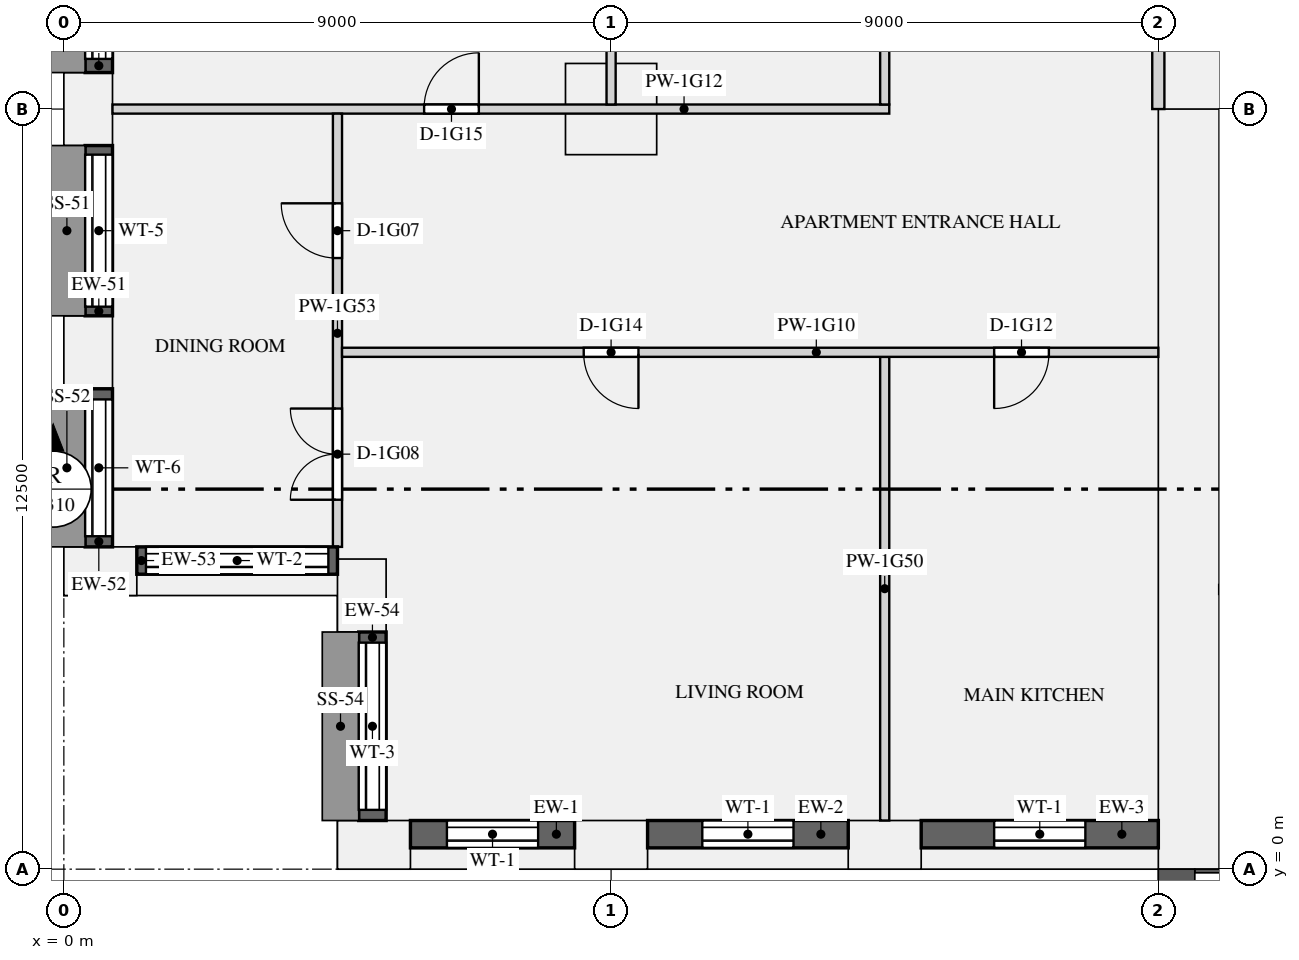
"""IFC4 building model, lengths in metres.
Left out: names, types, materials, properties, quantities, classifications, styles, units other than length and angle.
Written with IfcOpenShell. Run it as: python <this file> out.ifc"""

import sys

from ifc_helpers import new_model, si_unit, direction, frame, frame_2d, origin, origin_2d, place, context, subcontext, project, spatial, rectangle, extrude, element, fill, save


model = new_model("IFC4")
c1 = context("Model", 3, precision=1e-05, world=origin(), true_north=direction((0.0, 1.0)))
c2 = subcontext(c1, "Body", "Model", "MODEL_VIEW")
j1 = project(units=[si_unit("LENGTHUNIT", "METRE"), si_unit("PLANEANGLEUNIT", "RADIAN")], contexts=[c1])
p1 = place(None, origin())
s1 = spatial("IfcSite", under=j1, at=p1, CompositionType="ELEMENT")
p2 = place(p1, origin())
s2 = spatial("IfcBuilding", under=s1, at=p2, CompositionType="ELEMENT")
p3 = place(p2, frame((0.0, 0.0, 66.75)))
s3 = spatial("IfcBuildingStorey", under=s2, at=p3, CompositionType="ELEMENT", Elevation=66.75)
for number, where, z_axis, x_axis in (
    (1, (5.1, 0.4, 0.0), (0.0, 0.0, 1.0), (1.0, 0.0, 0.0)),
    (2, (9.0, 0.4, 0.0), (0.0, 0.0, 1.0), (1.0, 0.0, 0.0)),
    (3, (13.5, 0.4, 0.0), (0.0, 0.0, 1.0), (1.0, 0.0, 0.0)),
    (4, (0.4, 12.5, 0.0), (0.0, 0.0, 1.0), (0.0, -1.0, 0.0)),
    (5, (0.4, 8.5, 0.0), (0.0, 0.0, 1.0), (0.0, -1.0, 0.0)),
    (6, (0.6, 4.9, 0.0), (0.0, 0.0, 1.0), (1.0, 0.0, 0.0)),
    (7, (4.9, 4.5, 0.0), (0.0, 0.0, 1.0), (0.0, -1.0, 0.0)),
):
    element("IfcColumn", number, at=place(p3, frame(where, z_axis=z_axis, x_axis=x_axis)), inside=s3, PredefinedType="USERDEFINED", context=c2, shape_type="SweptSolid", body=[
        extrude(rectangle(XDim=1.2, YDim=0.8, at=origin_2d()), origin(), (0.0, 0.0, 1.0), 3.15),
    ])
p4 = place(p3, frame((9.0, 12.5, 0.0), z_axis=(0.0, 0.0, 1.0), x_axis=(1.0, 0.0, 0.0)))
e8 = element("IfcColumn", 8, at=p4, inside=s3, PredefinedType="COLUMN", context=c2, shape_type="SweptSolid", body=[
    extrude(rectangle(XDim=1.5, YDim=1.5, at=origin_2d()), origin(), (0.0, 0.0, 1.0), 3.15),
])
p5 = place(p3, frame((18.5, 0.0, 0.0), z_axis=(0.0, 0.0, 1.0), x_axis=(0.0, 1.0, 0.0)))
e9 = element("IfcWall", 9, at=p5, inside=s3, PredefinedType="SHEAR", context=c2, shape_type="SweptSolid", body=[
    extrude(rectangle(XDim=12.5, YDim=1.0, at=frame_2d((6.25, 0.0))), origin(), (0.0, 0.0, 1.0), 3.15),
])
p6 = place(p3, frame((5.7, 0.575, 0.9), z_axis=(0.0, 0.0, 1.0), x_axis=(1.0, 0.0, 0.0)))
e10 = element("IfcWall", 10, at=p6, inside=s3, PredefinedType="SOLIDWALL", context=c2, shape_type="SweptSolid", body=[
    extrude(rectangle(XDim=2.7, YDim=0.45, at=frame_2d((1.35, 0.0))), origin(), (0.0, 0.0, 1.0), 1.93),
])
p7 = place(p6, frame((0.6, 0.0, 0.15)))
e11 = element("IfcOpeningElement", 11, at=p7, cuts=e10, PredefinedType="OPENING", context=c2, shape_type="SweptSolid", body=[
    extrude(rectangle(XDim=1.5, YDim=1.5, at=frame_2d((0.75, 0.75))), frame((0.0, 0.235, 0.0), z_axis=(0.0, -1.0, 0.0), x_axis=(1.0, 0.0, 0.0)), (0.0, 0.0, 1.0), 0.47),
])
p8 = place(p3, frame((9.6, 0.575, 0.9), z_axis=(0.0, 0.0, 1.0), x_axis=(1.0, 0.0, 0.0)))
e12 = element("IfcWall", 12, at=p8, inside=s3, PredefinedType="SOLIDWALL", context=c2, shape_type="SweptSolid", body=[
    extrude(rectangle(XDim=3.3, YDim=0.45, at=frame_2d((1.65, 0.0))), origin(), (0.0, 0.0, 1.0), 1.93),
])
p9 = place(p8, frame((0.9, 0.0, 0.15)))
e13 = element("IfcOpeningElement", 13, at=p9, cuts=e12, PredefinedType="OPENING", context=c2, shape_type="SweptSolid", body=[
    extrude(rectangle(XDim=1.5, YDim=1.5, at=frame_2d((0.75, 0.75))), frame((0.0, 0.235, 0.0), z_axis=(0.0, -1.0, 0.0), x_axis=(1.0, 0.0, 0.0)), (0.0, 0.0, 1.0), 0.47),
])
p10 = place(p3, frame((14.1, 0.575, 0.9), z_axis=(0.0, 0.0, 1.0), x_axis=(1.0, 0.0, 0.0)))
e14 = element("IfcWall", 14, at=p10, inside=s3, PredefinedType="SOLIDWALL", context=c2, shape_type="SweptSolid", body=[
    extrude(rectangle(XDim=3.9, YDim=0.45, at=frame_2d((1.95, 0.0))), origin(), (0.0, 0.0, 1.0), 1.93),
])
p11 = place(p10, frame((1.2, 0.0, 0.15)))
e15 = element("IfcOpeningElement", 15, at=p11, cuts=e14, PredefinedType="OPENING", context=c2, shape_type="SweptSolid", body=[
    extrude(rectangle(XDim=1.5, YDim=1.5, at=frame_2d((0.75, 0.75))), frame((0.0, 0.235, 0.0), z_axis=(0.0, -1.0, 0.0), x_axis=(1.0, 0.0, 0.0)), (0.0, 0.0, 1.0), 0.47),
])
p12 = place(p3, frame((0.575, 15.3, 0.9), z_axis=(0.0, 0.0, 1.0), x_axis=(0.0, -1.0, 0.0)))
e16 = element("IfcWall", 16, at=p12, inside=s3, PredefinedType="SOLIDWALL", context=c2, shape_type="SweptSolid", body=[
    extrude(rectangle(XDim=2.2, YDim=0.45, at=frame_2d((1.1, 0.0))), origin(), (0.0, 0.0, 1.0), 1.93),
])
p13 = place(p12, frame((0.225, 0.0, 0.15)))
e17 = element("IfcOpeningElement", 17, at=p13, cuts=e16, PredefinedType="OPENING", context=c2, shape_type="SweptSolid", body=[
    extrude(rectangle(XDim=1.75, YDim=1.5, at=frame_2d((0.875, 0.75))), frame((0.0, 0.235, 0.0), z_axis=(0.0, -1.0, 0.0), x_axis=(1.0, 0.0, 0.0)), (0.0, 0.0, 1.0), 0.47),
])
p14 = place(p3, frame((0.575, 11.9, 0.9), z_axis=(0.0, 0.0, 1.0), x_axis=(0.0, -1.0, 0.0)))
e18 = element("IfcWall", 18, at=p14, inside=s3, PredefinedType="SOLIDWALL", context=c2, shape_type="SweptSolid", body=[
    extrude(rectangle(XDim=2.8, YDim=0.45, at=frame_2d((1.4, 0.0))), origin(), (0.0, 0.0, 1.0), 1.93),
])
p15 = place(p14, frame((0.15, 0.0, 0.15)))
e19 = element("IfcOpeningElement", 19, at=p15, cuts=e18, PredefinedType="OPENING", context=c2, shape_type="SweptSolid", body=[
    extrude(rectangle(XDim=2.5, YDim=1.5, at=frame_2d((1.25, 0.75))), frame((0.0, 0.235, 0.0), z_axis=(0.0, -1.0, 0.0), x_axis=(1.0, 0.0, 0.0)), (0.0, 0.0, 1.0), 0.47),
])
p16 = place(p3, frame((0.575, 7.9, 0.9), z_axis=(0.0, 0.0, 1.0), x_axis=(0.0, -1.0, 0.0)))
e20 = element("IfcWall", 20, at=p16, inside=s3, PredefinedType="SOLIDWALL", context=c2, shape_type="SweptSolid", body=[
    extrude(rectangle(XDim=2.6, YDim=0.45, at=frame_2d((1.3, 0.0))), origin(), (0.0, 0.0, 1.0), 1.93),
])
p17 = place(p16, frame((0.175, 0.0, 0.15)))
e21 = element("IfcOpeningElement", 21, at=p17, cuts=e20, PredefinedType="OPENING", context=c2, shape_type="SweptSolid", body=[
    extrude(rectangle(XDim=2.25, YDim=1.5, at=frame_2d((1.125, 0.75))), frame((0.0, 0.235, 0.0), z_axis=(0.0, -1.0, 0.0), x_axis=(1.0, 0.0, 0.0)), (0.0, 0.0, 1.0), 0.47),
])
p18 = place(p3, frame((1.2, 5.075, 0.9), z_axis=(0.0, 0.0, 1.0), x_axis=(1.0, 0.0, 0.0)))
e22 = element("IfcWall", 22, at=p18, inside=s3, PredefinedType="SOLIDWALL", context=c2, shape_type="SweptSolid", body=[
    extrude(rectangle(XDim=3.3, YDim=0.45, at=frame_2d((1.65, 0.0))), origin(), (0.0, 0.0, 1.0), 1.93),
])
p19 = place(p18, frame((0.15, 0.0, 0.15)))
e23 = element("IfcOpeningElement", 23, at=p19, cuts=e22, PredefinedType="OPENING", context=c2, shape_type="SweptSolid", body=[
    extrude(rectangle(XDim=3.0, YDim=1.5, at=frame_2d((1.5, 0.75))), frame((0.0, 0.235, 0.0), z_axis=(0.0, -1.0, 0.0), x_axis=(1.0, 0.0, 0.0)), (0.0, 0.0, 1.0), 0.47),
])
p20 = place(p3, frame((5.075, 3.9, 0.9), z_axis=(0.0, 0.0, 1.0), x_axis=(0.0, -1.0, 0.0)))
e24 = element("IfcWall", 24, at=p20, inside=s3, PredefinedType="SOLIDWALL", context=c2, shape_type="SweptSolid", body=[
    extrude(rectangle(XDim=3.1, YDim=0.45, at=frame_2d((1.55, 0.0))), origin(), (0.0, 0.0, 1.0), 1.93),
])
p21 = place(p20, frame((0.175, 0.0, 0.15)))
e25 = element("IfcOpeningElement", 25, at=p21, cuts=e24, PredefinedType="OPENING", context=c2, shape_type="SweptSolid", body=[
    extrude(rectangle(XDim=2.75, YDim=1.5, at=frame_2d((1.375, 0.75))), frame((0.0, 0.235, 0.0), z_axis=(0.0, -1.0, 0.0), x_axis=(1.0, 0.0, 0.0)), (0.0, 0.0, 1.0), 0.47),
])
p22 = place(p3, frame((19.0, 4.6, 0.0), z_axis=(0.0, 0.0, 1.0), x_axis=(1.0, 0.0, 0.0)))
e26 = element("IfcWall", 26, at=p22, inside=s3, PredefinedType="PARTITIONING", context=c2, shape_type="SweptSolid", body=[
    extrude(rectangle(XDim=8.3, YDim=0.15, at=frame_2d((4.15, 0.0))), origin(), (0.0, 0.0, 1.0), 2.83),
])
p23 = place(p22, frame((0.45, 0.0, 0.0)))
e27 = element("IfcOpeningElement", 27, at=p23, cuts=e26, PredefinedType="OPENING", context=c2, shape_type="SweptSolid", body=[
    extrude(rectangle(XDim=0.9, YDim=2.1, at=frame_2d((0.45, 1.05))), frame((0.0, 0.085, 0.0), z_axis=(0.0, -1.0, 0.0), x_axis=(1.0, 0.0, 0.0)), (0.0, 0.0, 1.0), 0.17),
])
p24 = place(p22, frame((5.85, 0.0, 0.0)))
e28 = element("IfcOpeningElement", 28, at=p24, cuts=e26, PredefinedType="OPENING", context=c2, shape_type="SweptSolid", body=[
    extrude(rectangle(XDim=0.9, YDim=2.1, at=frame_2d((0.45, 1.05))), frame((0.0, 0.085, 0.0), z_axis=(0.0, -1.0, 0.0), x_axis=(1.0, 0.0, 0.0)), (0.0, 0.0, 1.0), 0.17),
])
p25 = place(p3, frame((18.0, 12.5, 0.0), z_axis=(0.0, 0.0, 1.0), x_axis=(0.0, 1.0, 0.0)))
e29 = element("IfcWall", 29, at=p25, inside=s3, PredefinedType="PARTITIONING", context=c2, shape_type="SweptSolid", body=[
    extrude(rectangle(XDim=3.4, YDim=0.2, at=frame_2d((1.7, 0.0))), origin(), (0.0, 0.0, 1.0), 2.83),
])
p26 = place(p3, frame((4.575, 8.5, 0.0), z_axis=(0.0, 0.0, 1.0), x_axis=(1.0, 0.0, 0.0)))
e30 = element("IfcWall", 30, at=p26, inside=s3, PredefinedType="PARTITIONING", context=c2, shape_type="SweptSolid", body=[
    extrude(rectangle(XDim=13.425, YDim=0.15, at=frame_2d((6.712, 0.0))), origin(), (0.0, 0.0, 1.0), 2.83),
])
p27 = place(p26, frame((10.725, 0.0, 0.0)))
e31 = element("IfcOpeningElement", 31, at=p27, cuts=e30, PredefinedType="OPENING", context=c2, shape_type="SweptSolid", body=[
    extrude(rectangle(XDim=0.9, YDim=2.1, at=frame_2d((0.45, 1.05))), frame((0.0, 0.085, 0.0), z_axis=(0.0, -1.0, 0.0), x_axis=(1.0, 0.0, 0.0)), (0.0, 0.0, 1.0), 0.17),
])
p28 = place(p26, frame((3.975, 0.0, 0.0)))
e32 = element("IfcOpeningElement", 32, at=p28, cuts=e30, PredefinedType="OPENING", context=c2, shape_type="SweptSolid", body=[
    extrude(rectangle(XDim=0.9, YDim=2.1, at=frame_2d((0.45, 1.05))), frame((0.0, 0.085, 0.0), z_axis=(0.0, -1.0, 0.0), x_axis=(1.0, 0.0, 0.0)), (0.0, 0.0, 1.0), 0.17),
])
p29 = place(p3, frame((0.8, 12.5, 0.0), z_axis=(0.0, 0.0, 1.0), x_axis=(1.0, 0.0, 0.0)))
e33 = element("IfcWall", 33, at=p29, inside=s3, PredefinedType="PARTITIONING", context=c2, shape_type="SweptSolid", body=[
    extrude(rectangle(XDim=12.775, YDim=0.15, at=frame_2d((6.387, 0.0))), origin(), (0.0, 0.0, 1.0), 2.83),
])
p30 = place(p29, frame((5.125, 0.0, 0.0)))
e34 = element("IfcOpeningElement", 34, at=p30, cuts=e33, PredefinedType="OPENING", context=c2, shape_type="SweptSolid", body=[
    extrude(rectangle(XDim=0.9, YDim=2.1, at=frame_2d((0.45, 1.05))), frame((0.0, 0.085, 0.0), z_axis=(0.0, -1.0, 0.0), x_axis=(1.0, 0.0, 0.0)), (0.0, 0.0, 1.0), 0.17),
])
p31 = place(p3, frame((13.5, 0.8, 0.0), z_axis=(0.0, 0.0, 1.0), x_axis=(0.0, 1.0, 0.0)))
e35 = element("IfcWall", 35, at=p31, inside=s3, PredefinedType="PARTITIONING", context=c2, shape_type="SweptSolid", body=[
    extrude(rectangle(XDim=7.625, YDim=0.15, at=frame_2d((3.812, 0.0))), origin(), (0.0, 0.0, 1.0), 2.83),
])
p32 = place(p3, frame((13.5, 12.575, 0.0), z_axis=(0.0, 0.0, 1.0), x_axis=(0.0, 1.0, 0.0)))
e36 = element("IfcWall", 36, at=p32, inside=s3, PredefinedType="PARTITIONING", context=c2, shape_type="SweptSolid", body=[
    extrude(rectangle(XDim=7.85, YDim=0.15, at=frame_2d((3.925, 0.0))), origin(), (0.0, 0.0, 1.0), 2.83),
])
p33 = place(p3, frame((4.5, 5.3, 0.0), z_axis=(0.0, 0.0, 1.0), x_axis=(0.0, 1.0, 0.0)))
e37 = element("IfcWall", 37, at=p33, inside=s3, PredefinedType="PARTITIONING", context=c2, shape_type="SweptSolid", body=[
    extrude(rectangle(XDim=7.125, YDim=0.15, at=frame_2d((3.562, 0.0))), origin(), (0.0, 0.0, 1.0), 2.83),
])
p34 = place(p33, frame((4.75, 0.0, 0.0)))
e38 = element("IfcOpeningElement", 38, at=p34, cuts=e37, PredefinedType="OPENING", context=c2, shape_type="SweptSolid", body=[
    extrude(rectangle(XDim=0.9, YDim=2.1, at=frame_2d((0.45, 1.05))), frame((0.0, 0.085, 0.0), z_axis=(0.0, -1.0, 0.0), x_axis=(1.0, 0.0, 0.0)), (0.0, 0.0, 1.0), 0.17),
])
p35 = place(p33, frame((0.775, 0.0, 0.0)))
e39 = element("IfcOpeningElement", 39, at=p35, cuts=e37, PredefinedType="OPENING", context=c2, shape_type="SweptSolid", body=[
    extrude(rectangle(XDim=1.5, YDim=2.1, at=frame_2d((0.75, 1.05))), frame((0.0, 0.085, 0.0), z_axis=(0.0, -1.0, 0.0), x_axis=(1.0, 0.0, 0.0)), (0.0, 0.0, 1.0), 0.17),
])
p36 = place(p3, frame((9.0, 12.575, 0.0), z_axis=(0.0, 0.0, 1.0), x_axis=(0.0, 1.0, 0.0)))
e40 = element("IfcWall", 40, at=p36, inside=s3, PredefinedType="PARTITIONING", context=c2, shape_type="SweptSolid", body=[
    extrude(rectangle(XDim=7.85, YDim=0.15, at=frame_2d((3.925, 0.0))), origin(), (0.0, 0.0, 1.0), 2.83),
])
p37 = place(p36, frame((1.9, 0.0, 0.0)))
e41 = element("IfcOpeningElement", 41, at=p37, cuts=e40, PredefinedType="OPENING", context=c2, shape_type="SweptSolid", body=[
    extrude(rectangle(XDim=0.8, YDim=2.1, at=frame_2d((0.4, 1.05))), frame((0.0, 0.085, 0.0), z_axis=(0.0, -1.0, 0.0), x_axis=(1.0, 0.0, 0.0)), (0.0, 0.0, 1.0), 0.17),
])
p38 = place(p7, origin())
e42 = element("IfcWindow", 42, at=p38, inside=s3, PartitioningType="SINGLE_PANEL", PredefinedType="WINDOW", context=c2, shape_type="SweptSolid", body=[
    extrude(rectangle(XDim=1.5, YDim=1.5, at=frame_2d((0.75, 0.75))), frame((0.0, -0.065, 0.0), z_axis=(0.0, -1.0, 0.0), x_axis=(1.0, 0.0, 0.0)), (0.0, 0.0, 1.0), 0.06),
])
fill(e11, e42)
p39 = place(p9, origin())
e43 = element("IfcWindow", 43, at=p39, inside=s3, PartitioningType="SINGLE_PANEL", PredefinedType="WINDOW", context=c2, shape_type="SweptSolid", body=[
    extrude(rectangle(XDim=1.5, YDim=1.5, at=frame_2d((0.75, 0.75))), frame((0.0, -0.065, 0.0), z_axis=(0.0, -1.0, 0.0), x_axis=(1.0, 0.0, 0.0)), (0.0, 0.0, 1.0), 0.06),
])
fill(e13, e43)
p40 = place(p11, origin())
e44 = element("IfcWindow", 44, at=p40, inside=s3, PartitioningType="SINGLE_PANEL", PredefinedType="WINDOW", context=c2, shape_type="SweptSolid", body=[
    extrude(rectangle(XDim=1.5, YDim=1.5, at=frame_2d((0.75, 0.75))), frame((0.0, -0.065, 0.0), z_axis=(0.0, -1.0, 0.0), x_axis=(1.0, 0.0, 0.0)), (0.0, 0.0, 1.0), 0.06),
])
fill(e15, e44)
p41 = place(p13, origin())
e45 = element("IfcWindow", 45, at=p41, inside=s3, PartitioningType="SINGLE_PANEL", PredefinedType="WINDOW", context=c2, shape_type="SweptSolid", body=[
    extrude(rectangle(XDim=1.75, YDim=1.5, at=frame_2d((0.875, 0.75))), frame((0.0, -0.065, 0.0), z_axis=(0.0, -1.0, 0.0), x_axis=(1.0, 0.0, 0.0)), (0.0, 0.0, 1.0), 0.06),
])
fill(e17, e45)
p42 = place(p15, origin())
e46 = element("IfcWindow", 46, at=p42, inside=s3, PartitioningType="SINGLE_PANEL", PredefinedType="WINDOW", context=c2, shape_type="SweptSolid", body=[
    extrude(rectangle(XDim=2.5, YDim=1.5, at=frame_2d((1.25, 0.75))), frame((0.0, -0.065, 0.0), z_axis=(0.0, -1.0, 0.0), x_axis=(1.0, 0.0, 0.0)), (0.0, 0.0, 1.0), 0.06),
])
fill(e19, e46)
p43 = place(p17, origin())
e47 = element("IfcWindow", 47, at=p43, inside=s3, PartitioningType="SINGLE_PANEL", PredefinedType="WINDOW", context=c2, shape_type="SweptSolid", body=[
    extrude(rectangle(XDim=2.25, YDim=1.5, at=frame_2d((1.125, 0.75))), frame((0.0, -0.065, 0.0), z_axis=(0.0, -1.0, 0.0), x_axis=(1.0, 0.0, 0.0)), (0.0, 0.0, 1.0), 0.06),
])
fill(e21, e47)
p44 = place(p19, origin())
e48 = element("IfcWindow", 48, at=p44, inside=s3, PartitioningType="SINGLE_PANEL", PredefinedType="WINDOW", context=c2, shape_type="SweptSolid", body=[
    extrude(rectangle(XDim=3.0, YDim=1.5, at=frame_2d((1.5, 0.75))), frame((0.0, -0.065, 0.0), z_axis=(0.0, -1.0, 0.0), x_axis=(1.0, 0.0, 0.0)), (0.0, 0.0, 1.0), 0.06),
])
fill(e23, e48)
p45 = place(p21, origin())
e49 = element("IfcWindow", 49, at=p45, inside=s3, PartitioningType="SINGLE_PANEL", PredefinedType="WINDOW", context=c2, shape_type="SweptSolid", body=[
    extrude(rectangle(XDim=2.75, YDim=1.5, at=frame_2d((1.375, 0.75))), frame((0.0, -0.065, 0.0), z_axis=(0.0, -1.0, 0.0), x_axis=(1.0, 0.0, 0.0)), (0.0, 0.0, 1.0), 0.06),
])
fill(e25, e49)
p46 = place(p34, origin())
e50 = element("IfcDoor", 50, at=p46, inside=s3, OperationType="SINGLE_SWING_RIGHT", PredefinedType="DOOR", context=c2, shape_type="SweptSolid", body=[
    extrude(rectangle(XDim=0.9, YDim=2.1, at=frame_2d((0.45, 1.05))), frame((0.0, 0.025, 0.0), z_axis=(0.0, -1.0, 0.0), x_axis=(1.0, 0.0, 0.0)), (0.0, 0.0, 1.0), 0.05),
])
fill(e38, e50)
p47 = place(p35, origin())
e51 = element("IfcDoor", 51, at=p47, inside=s3, OperationType="DOUBLE_DOOR_SINGLE_SWING", PredefinedType="DOOR", context=c2, shape_type="SweptSolid", body=[
    extrude(rectangle(XDim=1.5, YDim=2.1, at=frame_2d((0.75, 1.05))), frame((0.0, 0.025, 0.0), z_axis=(0.0, -1.0, 0.0), x_axis=(1.0, 0.0, 0.0)), (0.0, 0.0, 1.0), 0.05),
])
fill(e39, e51)
p48 = place(p27, frame((0.9, 0.0, 0.0), z_axis=(0.0, 0.0, 1.0), x_axis=(-1.0, 0.0, 0.0)))
e52 = element("IfcDoor", 52, at=p48, inside=s3, OperationType="SINGLE_SWING_RIGHT", PredefinedType="DOOR", context=c2, shape_type="SweptSolid", body=[
    extrude(rectangle(XDim=0.9, YDim=2.1, at=frame_2d((0.45, 1.05))), frame((0.0, 0.025, 0.0), z_axis=(0.0, -1.0, 0.0), x_axis=(1.0, 0.0, 0.0)), (0.0, 0.0, 1.0), 0.05),
])
fill(e31, e52)
p49 = place(p28, frame((0.9, 0.0, 0.0), z_axis=(0.0, 0.0, 1.0), x_axis=(-1.0, 0.0, 0.0)))
e53 = element("IfcDoor", 53, at=p49, inside=s3, OperationType="SINGLE_SWING_LEFT", PredefinedType="DOOR", context=c2, shape_type="SweptSolid", body=[
    extrude(rectangle(XDim=0.9, YDim=2.1, at=frame_2d((0.45, 1.05))), frame((0.0, 0.025, 0.0), z_axis=(0.0, -1.0, 0.0), x_axis=(1.0, 0.0, 0.0)), (0.0, 0.0, 1.0), 0.05),
])
fill(e32, e53)
p50 = place(p30, origin())
e54 = element("IfcDoor", 54, at=p50, inside=s3, OperationType="SINGLE_SWING_RIGHT", PredefinedType="DOOR", context=c2, shape_type="SweptSolid", body=[
    extrude(rectangle(XDim=0.9, YDim=2.1, at=frame_2d((0.45, 1.05))), frame((0.0, 0.025, 0.0), z_axis=(0.0, -1.0, 0.0), x_axis=(1.0, 0.0, 0.0)), (0.0, 0.0, 1.0), 0.05),
])
fill(e34, e54)
save(model, sys.argv[1])
